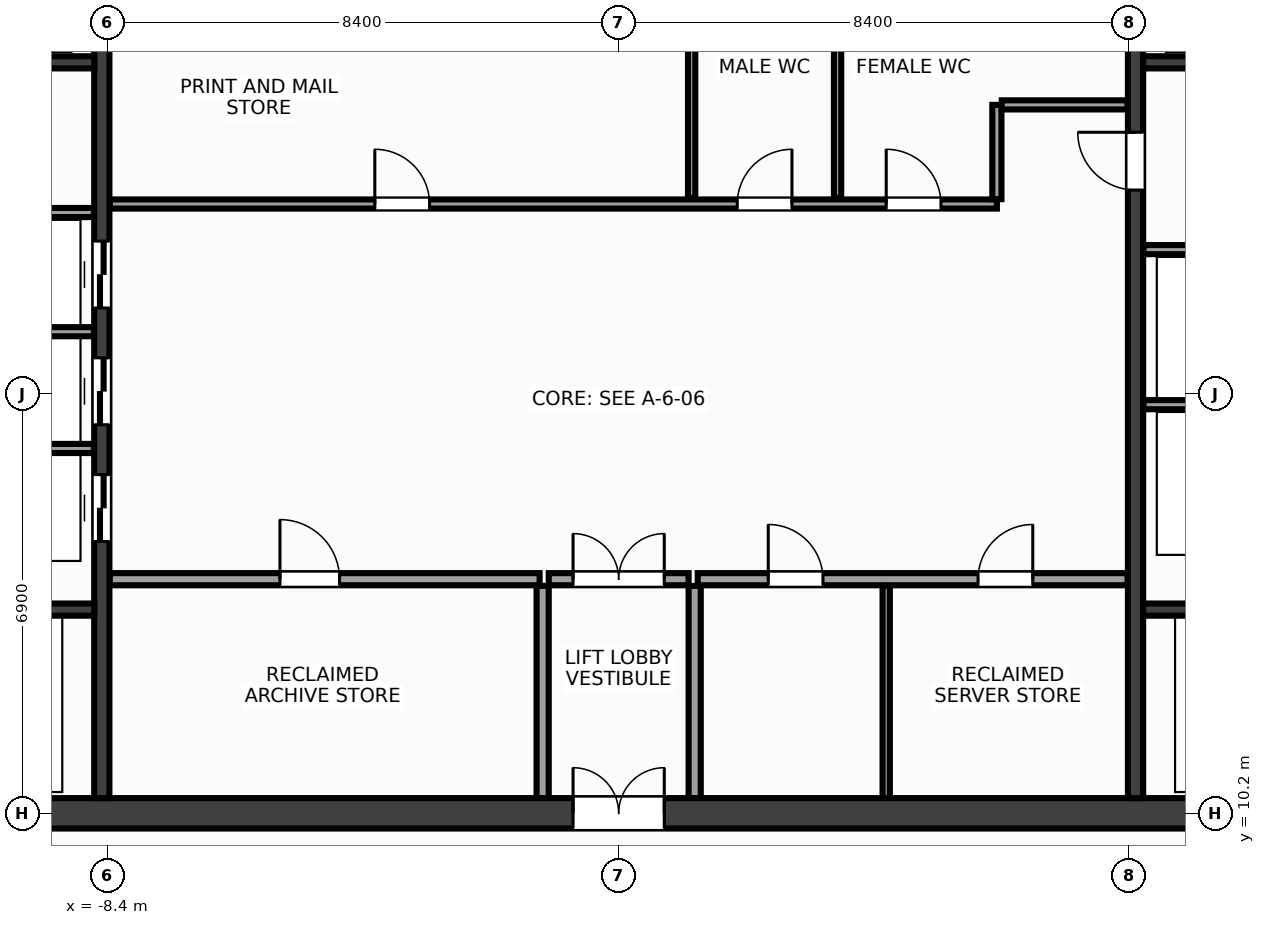
"""IFC4 building model, lengths in metres.
Left out: names, types, materials, properties, quantities, classifications, styles, units other than length and angle.
Written with IfcOpenShell. Run it as: python <this file> out.ifc"""

import sys

from ifc_helpers import new_model, si_unit, direction, frame, frame_2d, origin, place, context, subcontext, project, spatial, rectangle, extrude, source, transform, mapped, element, fill, save


model = new_model("IFC4")
c1 = context("Model", 3, precision=1e-05, world=origin(), true_north=direction((0.0, 1.0)))
c2 = subcontext(c1, "Body", "Model", "MODEL_VIEW")
j1 = project(units=[si_unit("LENGTHUNIT", "METRE"), si_unit("PLANEANGLEUNIT", "RADIAN")], contexts=[c1])
p1 = place(None, origin())
s1 = spatial("IfcSite", under=j1, at=p1, CompositionType="ELEMENT")
p2 = place(p1, origin())
s2 = spatial("IfcBuilding", under=s1, at=p2, CompositionType="ELEMENT")
p3 = place(p2, frame((0.0, 0.0, 221.6)))
s3 = spatial("IfcBuildingStorey", under=s2, at=p3, CompositionType="ELEMENT", Elevation=221.6)
m1 = source(origin(), c2, "Body", "SweptSolid", [
    extrude(rectangle(XDim=31.7, YDim=0.5, at=frame_2d((15.85, 0.0))), origin(), (0.0, 0.0, 1.0), 3.6),
])
p4 = place(p3, frame((-15.85, 10.2, 0.0), z_axis=(0.0, 0.0, 1.0), x_axis=(1.0, 0.0, 0.0)))
e1 = element("IfcWall", 1, at=p4, inside=s3, PredefinedType="SHEAR", context=c2, shape_type="MappedRepresentation", body=[
    mapped(m1, transform((0.0, 0.0, 0.0), x_axis=(1.0, 0.0, 0.0), y_axis=(0.0, 1.0, 0.0), z_axis=(0.0, 0.0, 1.0), scale=1.0)),
])
p5 = place(p4, frame((1.7, 0.0, 0.0)))
e2 = element("IfcOpeningElement", 2, at=p5, cuts=e1, PredefinedType="OPENING", context=c2, shape_type="SweptSolid", body=[
    extrude(rectangle(XDim=1.6, YDim=2.15, at=frame_2d((0.8, 1.075))), frame((0.0, 0.262, 0.0), z_axis=(0.0, -1.0, 0.0), x_axis=(1.0, 0.0, 0.0)), (0.0, 0.0, 1.0), 0.524),
])
p6 = place(p4, frame((28.4, 0.0, 0.0)))
e3 = element("IfcOpeningElement", 3, at=p6, cuts=e1, PredefinedType="OPENING", context=c2, shape_type="SweptSolid", body=[
    extrude(rectangle(XDim=1.6, YDim=2.15, at=frame_2d((0.8, 1.075))), frame((0.0, 0.262, 0.0), z_axis=(0.0, -1.0, 0.0), x_axis=(1.0, 0.0, 0.0)), (0.0, 0.0, 1.0), 0.524),
])
p7 = place(p4, frame((15.1, 0.0, 0.0)))
e4 = element("IfcOpeningElement", 4, at=p7, cuts=e1, PredefinedType="OPENING", context=c2, shape_type="SweptSolid", body=[
    extrude(rectangle(XDim=1.5, YDim=2.2, at=frame_2d((0.75, 1.1))), frame((0.0, 0.262, 0.0), z_axis=(0.0, -1.0, 0.0), x_axis=(1.0, 0.0, 0.0)), (0.0, 0.0, 1.0), 0.524),
])
m2 = source(origin(), c2, "Body", "SweptSolid", [
    extrude(rectangle(XDim=13.1, YDim=0.25, at=frame_2d((6.55, 0.0))), origin(), (0.0, 0.0, 1.0), 3.6),
])
p8 = place(p3, frame((-8.5, 10.45, 0.0), z_axis=(0.0, 0.0, 1.0), x_axis=(0.0, 1.0, 0.0)))
e5 = element("IfcWall", 5, at=p8, inside=s3, PredefinedType="SHEAR", context=c2, shape_type="MappedRepresentation", body=[
    mapped(m2, transform((0.0, 0.0, 0.0), x_axis=(1.0, 0.0, 0.0), y_axis=(0.0, 1.0, 0.0), z_axis=(0.0, 0.0, 1.0), scale=1.0)),
])
p9 = place(p8, frame((4.22, 0.0, 0.0)))
e6 = element("IfcOpeningElement", 6, at=p9, cuts=e5, PredefinedType="OPENING", context=c2, shape_type="SweptSolid", body=[
    extrude(rectangle(XDim=1.1, YDim=2.15, at=frame_2d((0.55, 1.075))), frame((0.0, 0.137, 0.0), z_axis=(0.0, -1.0, 0.0), x_axis=(1.0, 0.0, 0.0)), (0.0, 0.0, 1.0), 0.274),
])
p10 = place(p8, frame((6.14, 0.0, 0.0)))
e7 = element("IfcOpeningElement", 7, at=p10, cuts=e5, PredefinedType="OPENING", context=c2, shape_type="SweptSolid", body=[
    extrude(rectangle(XDim=1.1, YDim=2.15, at=frame_2d((0.55, 1.075))), frame((0.0, 0.137, 0.0), z_axis=(0.0, -1.0, 0.0), x_axis=(1.0, 0.0, 0.0)), (0.0, 0.0, 1.0), 0.274),
])
p11 = place(p8, frame((8.06, 0.0, 0.0)))
e8 = element("IfcOpeningElement", 8, at=p11, cuts=e5, PredefinedType="OPENING", context=c2, shape_type="SweptSolid", body=[
    extrude(rectangle(XDim=1.1, YDim=2.15, at=frame_2d((0.55, 1.075))), frame((0.0, 0.137, 0.0), z_axis=(0.0, -1.0, 0.0), x_axis=(1.0, 0.0, 0.0)), (0.0, 0.0, 1.0), 0.274),
])
p12 = place(p3, frame((8.5, 10.45, 0.0), z_axis=(0.0, 0.0, 1.0), x_axis=(0.0, 1.0, 0.0)))
e9 = element("IfcWall", 9, at=p12, inside=s3, PredefinedType="SHEAR", context=c2, shape_type="MappedRepresentation", body=[
    mapped(m2, transform((0.0, 0.0, 0.0), x_axis=(1.0, 0.0, 0.0), y_axis=(0.0, 1.0, 0.0), z_axis=(0.0, 0.0, 1.0), scale=1.0)),
])
p13 = place(p12, frame((10.0, 0.0, 0.0)))
e10 = element("IfcOpeningElement", 10, at=p13, cuts=e9, PredefinedType="OPENING", context=c2, shape_type="SweptSolid", body=[
    extrude(rectangle(XDim=0.95, YDim=2.15, at=frame_2d((0.475, 1.075))), frame((0.0, 0.137, 0.0), z_axis=(0.0, -1.0, 0.0), x_axis=(1.0, 0.0, 0.0)), (0.0, 0.0, 1.0), 0.274),
])
m3 = source(origin(), c2, "Body", "SweptSolid", [
    extrude(rectangle(XDim=2.825, YDim=0.2, at=frame_2d((1.413, 0.0))), origin(), (0.0, 0.0, 1.0), 3.6),
])
for number, where, z_axis, x_axis in (
    (11, (-11.45, 13.55, 0.0), (0.0, 0.0, 1.0), (1.0, 0.0, 0.0)),
    (12, (8.625, 13.55, 0.0), (0.0, 0.0, 1.0), (1.0, 0.0, 0.0)),
):
    element("IfcWall", number, at=place(p3, frame(where, z_axis=z_axis, x_axis=x_axis)), inside=s3, PredefinedType="SHEAR", context=c2, shape_type="MappedRepresentation", body=[
        mapped(m3, transform((0.0, 0.0, 0.0), x_axis=(1.0, 0.0, 0.0), y_axis=(0.0, 1.0, 0.0), z_axis=(0.0, 0.0, 1.0), scale=1.0)),
    ])
m4 = source(origin(), c2, "Body", "SweptSolid", [
    extrude(rectangle(XDim=3.02, YDim=0.2, at=frame_2d((1.51, 0.0))), origin(), (0.0, 0.0, 1.0), 3.6),
])
for number, where, z_axis, x_axis in (
    (13, (-11.645, 22.55, 0.0), (0.0, 0.0, 1.0), (1.0, 0.0, 0.0)),
    (14, (8.625, 22.55, 0.0), (0.0, 0.0, 1.0), (1.0, 0.0, 0.0)),
):
    element("IfcWall", number, at=place(p3, frame(where, z_axis=z_axis, x_axis=x_axis)), inside=s3, PredefinedType="SHEAR", context=c2, shape_type="MappedRepresentation", body=[
        mapped(m4, transform((0.0, 0.0, 0.0), x_axis=(1.0, 0.0, 0.0), y_axis=(0.0, 1.0, 0.0), z_axis=(0.0, 0.0, 1.0), scale=1.0)),
    ])
m5 = source(origin(), c2, "Body", "SweptSolid", [
    extrude(rectangle(XDim=3.01, YDim=0.15, at=frame_2d((1.505, 0.0))), origin(), (0.0, 0.0, 1.0), 3.38),
])
for number, where, z_axis, x_axis in (
    (15, (-11.64, 16.2, 0.0), (0.0, 0.0, 1.0), (1.0, 0.0, 0.0)),
    (16, (-11.64, 18.12, 0.0), (0.0, 0.0, 1.0), (1.0, 0.0, 0.0)),
    (17, (-11.64, 20.08, 0.0), (0.0, 0.0, 1.0), (1.0, 0.0, 0.0)),
    (18, (8.63, 16.92, 0.0), (0.0, 0.0, 1.0), (1.0, 0.0, 0.0)),
    (19, (8.63, 19.47, 0.0), (0.0, 0.0, 1.0), (1.0, 0.0, 0.0)),
):
    element("IfcWall", number, at=place(p3, frame(where, z_axis=z_axis, x_axis=x_axis)), inside=s3, PredefinedType="PARTITIONING", context=c2, shape_type="MappedRepresentation", body=[
        mapped(m5, transform((0.0, 0.0, 0.0), x_axis=(1.0, 0.0, 0.0), y_axis=(0.0, 1.0, 0.0), z_axis=(0.0, 0.0, 1.0), scale=1.0)),
    ])
m6 = source(origin(), c2, "Body", "SweptSolid", [
    extrude(rectangle(XDim=7.07, YDim=0.2, at=frame_2d((3.535, 0.0))), origin(), (0.0, 0.0, 1.0), 3.38),
])
p14 = place(p3, frame((-8.37, 14.05, 0.0), z_axis=(0.0, 0.0, 1.0), x_axis=(1.0, 0.0, 0.0)))
e20 = element("IfcWall", 20, at=p14, inside=s3, PredefinedType="PARTITIONING", context=c2, shape_type="MappedRepresentation", body=[
    mapped(m6, transform((0.0, 0.0, 0.0), x_axis=(1.0, 0.0, 0.0), y_axis=(0.0, 1.0, 0.0), z_axis=(0.0, 0.0, 1.0), scale=1.0)),
])
p15 = place(p14, frame((2.8, 0.0, 0.0)))
e21 = element("IfcOpeningElement", 21, at=p15, cuts=e20, PredefinedType="OPENING", context=c2, shape_type="SweptSolid", body=[
    extrude(rectangle(XDim=0.98, YDim=2.15, at=frame_2d((0.49, 1.075))), frame((0.0, 0.112, 0.0), z_axis=(0.0, -1.0, 0.0), x_axis=(1.0, 0.0, 0.0)), (0.0, 0.0, 1.0), 0.224),
])
p16 = place(p3, frame((1.3, 14.05, 0.0), z_axis=(0.0, 0.0, 1.0), x_axis=(1.0, 0.0, 0.0)))
e22 = element("IfcWall", 22, at=p16, inside=s3, PredefinedType="PARTITIONING", context=c2, shape_type="MappedRepresentation", body=[
    mapped(m6, transform((0.0, 0.0, 0.0), x_axis=(1.0, 0.0, 0.0), y_axis=(0.0, 1.0, 0.0), z_axis=(0.0, 0.0, 1.0), scale=1.0)),
])
p17 = place(p16, frame((1.16, 0.0, 0.0)))
e23 = element("IfcOpeningElement", 23, at=p17, cuts=e22, PredefinedType="OPENING", context=c2, shape_type="SweptSolid", body=[
    extrude(rectangle(XDim=0.9, YDim=2.15, at=frame_2d((0.45, 1.075))), frame((0.0, 0.112, 0.0), z_axis=(0.0, -1.0, 0.0), x_axis=(1.0, 0.0, 0.0)), (0.0, 0.0, 1.0), 0.224),
])
p18 = place(p16, frame((4.61, 0.0, 0.0)))
e24 = element("IfcOpeningElement", 24, at=p18, cuts=e22, PredefinedType="OPENING", context=c2, shape_type="SweptSolid", body=[
    extrude(rectangle(XDim=0.9, YDim=2.15, at=frame_2d((0.45, 1.075))), frame((0.0, 0.112, 0.0), z_axis=(0.0, -1.0, 0.0), x_axis=(1.0, 0.0, 0.0)), (0.0, 0.0, 1.0), 0.224),
])
m7 = source(origin(), c2, "Body", "SweptSolid", [
    extrude(rectangle(XDim=3.49, YDim=0.2, at=frame_2d((1.745, 0.0))), origin(), (0.0, 0.0, 1.0), 3.38),
])
for number, where, z_axis, x_axis in (
    (25, (-1.25, 10.45, 0.0), (0.0, 0.0, 1.0), (0.0, 1.0, 0.0)),
    (26, (1.25, 10.45, 0.0), (0.0, 0.0, 1.0), (0.0, 1.0, 0.0)),
):
    element("IfcWall", number, at=place(p3, frame(where, z_axis=z_axis, x_axis=x_axis)), inside=s3, PredefinedType="PARTITIONING", context=c2, shape_type="MappedRepresentation", body=[
        mapped(m7, transform((0.0, 0.0, 0.0), x_axis=(1.0, 0.0, 0.0), y_axis=(0.0, 1.0, 0.0), z_axis=(0.0, 0.0, 1.0), scale=1.0)),
    ])
m8 = source(origin(), c2, "Body", "SweptSolid", [
    extrude(rectangle(XDim=2.3, YDim=0.2, at=frame_2d((1.15, 0.0))), origin(), (0.0, 0.0, 1.0), 3.38),
])
p19 = place(p3, frame((-1.15, 14.05, 0.0), z_axis=(0.0, 0.0, 1.0), x_axis=(1.0, 0.0, 0.0)))
e27 = element("IfcWall", 27, at=p19, inside=s3, PredefinedType="PARTITIONING", context=c2, shape_type="MappedRepresentation", body=[
    mapped(m8, transform((0.0, 0.0, 0.0), x_axis=(1.0, 0.0, 0.0), y_axis=(0.0, 1.0, 0.0), z_axis=(0.0, 0.0, 1.0), scale=1.0)),
])
p20 = place(p19, frame((0.4, 0.0, 0.0)))
e28 = element("IfcOpeningElement", 28, at=p20, cuts=e27, PredefinedType="OPENING", context=c2, shape_type="SweptSolid", body=[
    extrude(rectangle(XDim=1.5, YDim=2.2, at=frame_2d((0.75, 1.1))), frame((0.0, 0.112, 0.0), z_axis=(0.0, -1.0, 0.0), x_axis=(1.0, 0.0, 0.0)), (0.0, 0.0, 1.0), 0.224),
])
m9 = source(origin(), c2, "Body", "SweptSolid", [
    extrude(rectangle(XDim=14.59, YDim=0.15, at=frame_2d((7.295, 0.0))), origin(), (0.0, 0.0, 1.0), 3.38),
])
p21 = place(p3, frame((-8.37, 20.22, 0.0), z_axis=(0.0, 0.0, 1.0), x_axis=(1.0, 0.0, 0.0)))
e29 = element("IfcWall", 29, at=p21, inside=s3, PredefinedType="PARTITIONING", context=c2, shape_type="MappedRepresentation", body=[
    mapped(m9, transform((0.0, 0.0, 0.0), x_axis=(1.0, 0.0, 0.0), y_axis=(0.0, 1.0, 0.0), z_axis=(0.0, 0.0, 1.0), scale=1.0)),
])
p22 = place(p21, frame((4.36, 0.0, 0.0)))
e30 = element("IfcOpeningElement", 30, at=p22, cuts=e29, PredefinedType="OPENING", context=c2, shape_type="SweptSolid", body=[
    extrude(rectangle(XDim=0.9, YDim=2.15, at=frame_2d((0.45, 1.075))), frame((0.0, 0.087, 0.0), z_axis=(0.0, -1.0, 0.0), x_axis=(1.0, 0.0, 0.0)), (0.0, 0.0, 1.0), 0.174),
])
p23 = place(p21, frame((10.32, 0.0, 0.0)))
e31 = element("IfcOpeningElement", 31, at=p23, cuts=e29, PredefinedType="OPENING", context=c2, shape_type="SweptSolid", body=[
    extrude(rectangle(XDim=0.9, YDim=2.15, at=frame_2d((0.45, 1.075))), frame((0.0, 0.087, 0.0), z_axis=(0.0, -1.0, 0.0), x_axis=(1.0, 0.0, 0.0)), (0.0, 0.0, 1.0), 0.174),
])
p24 = place(p21, frame((12.77, 0.0, 0.0)))
e32 = element("IfcOpeningElement", 32, at=p24, cuts=e29, PredefinedType="OPENING", context=c2, shape_type="SweptSolid", body=[
    extrude(rectangle(XDim=0.9, YDim=2.15, at=frame_2d((0.45, 1.075))), frame((0.0, 0.087, 0.0), z_axis=(0.0, -1.0, 0.0), x_axis=(1.0, 0.0, 0.0)), (0.0, 0.0, 1.0), 0.174),
])
m10 = source(origin(), c2, "Body", "SweptSolid", [
    extrude(rectangle(XDim=1.55, YDim=0.15, at=frame_2d((0.775, 0.0))), origin(), (0.0, 0.0, 1.0), 3.38),
])
p25 = place(p3, frame((6.22, 20.3, 0.0), z_axis=(0.0, 0.0, 1.0), x_axis=(0.0, 1.0, 0.0)))
e33 = element("IfcWall", 33, at=p25, inside=s3, PredefinedType="PARTITIONING", context=c2, shape_type="MappedRepresentation", body=[
    mapped(m10, transform((0.0, 0.0, 0.0), x_axis=(1.0, 0.0, 0.0), y_axis=(0.0, 1.0, 0.0), z_axis=(0.0, 0.0, 1.0), scale=1.0)),
])
m11 = source(origin(), c2, "Body", "SweptSolid", [
    extrude(rectangle(XDim=2.07, YDim=0.15, at=frame_2d((1.035, 0.0))), origin(), (0.0, 0.0, 1.0), 3.38),
])
p26 = place(p3, frame((6.3, 21.85, 0.0), z_axis=(0.0, 0.0, 1.0), x_axis=(1.0, 0.0, 0.0)))
e34 = element("IfcWall", 34, at=p26, inside=s3, PredefinedType="PARTITIONING", context=c2, shape_type="MappedRepresentation", body=[
    mapped(m11, transform((0.0, 0.0, 0.0), x_axis=(1.0, 0.0, 0.0), y_axis=(0.0, 1.0, 0.0), z_axis=(0.0, 0.0, 1.0), scale=1.0)),
])
m12 = source(origin(), c2, "Body", "SweptSolid", [
    extrude(rectangle(XDim=3.49, YDim=0.12, at=frame_2d((1.745, 0.0))), origin(), (0.0, 0.0, 1.0), 3.38),
])
p27 = place(p3, frame((4.4, 10.45, 0.0), z_axis=(0.0, 0.0, 1.0), x_axis=(0.0, 1.0, 0.0)))
e35 = element("IfcWall", 35, at=p27, inside=s3, PredefinedType="PARTITIONING", context=c2, shape_type="MappedRepresentation", body=[
    mapped(m12, transform((0.0, 0.0, 0.0), x_axis=(1.0, 0.0, 0.0), y_axis=(0.0, 1.0, 0.0), z_axis=(0.0, 0.0, 1.0), scale=1.0)),
])
m13 = source(origin(), c2, "Body", "SweptSolid", [
    extrude(rectangle(XDim=3.19, YDim=0.12, at=frame_2d((1.595, 0.0))), origin(), (0.0, 0.0, 1.0), 3.38),
])
for number, where, z_axis, x_axis in (
    (36, (1.2, 20.32, 0.0), (0.0, 0.0, 1.0), (0.0, 1.0, 0.0)),
    (37, (3.6, 20.32, 0.0), (0.0, 0.0, 1.0), (0.0, 1.0, 0.0)),
):
    element("IfcWall", number, at=place(p3, frame(where, z_axis=z_axis, x_axis=x_axis)), inside=s3, PredefinedType="PARTITIONING", context=c2, shape_type="MappedRepresentation", body=[
        mapped(m13, transform((0.0, 0.0, 0.0), x_axis=(1.0, 0.0, 0.0), y_axis=(0.0, 1.0, 0.0), z_axis=(0.0, 0.0, 1.0), scale=1.0)),
    ])
m14 = source(origin(), c2, "Body", "SweptSolid", [
    extrude(rectangle(XDim=1.1, YDim=2.15, at=frame_2d((0.55, 1.075))), frame((0.0, 0.025, 0.0), z_axis=(0.0, -1.0, 0.0), x_axis=(1.0, 0.0, 0.0)), (0.0, 0.0, 1.0), 0.05),
])
p28 = place(p9, origin())
e38 = element("IfcDoor", 38, at=p28, inside=s3, OperationType="DOUBLE_DOOR_SLIDING", PredefinedType="DOOR", context=c2, shape_type="MappedRepresentation", body=[
    mapped(m14, transform((0.0, 0.0, 0.0), x_axis=(1.0, 0.0, 0.0), y_axis=(0.0, 1.0, 0.0), z_axis=(0.0, 0.0, 1.0), scale=1.0)),
])
fill(e6, e38)
p29 = place(p10, origin())
e39 = element("IfcDoor", 39, at=p29, inside=s3, OperationType="DOUBLE_DOOR_SLIDING", PredefinedType="DOOR", context=c2, shape_type="MappedRepresentation", body=[
    mapped(m14, transform((0.0, 0.0, 0.0), x_axis=(1.0, 0.0, 0.0), y_axis=(0.0, 1.0, 0.0), z_axis=(0.0, 0.0, 1.0), scale=1.0)),
])
fill(e7, e39)
p30 = place(p11, origin())
e40 = element("IfcDoor", 40, at=p30, inside=s3, OperationType="DOUBLE_DOOR_SLIDING", PredefinedType="DOOR", context=c2, shape_type="MappedRepresentation", body=[
    mapped(m14, transform((0.0, 0.0, 0.0), x_axis=(1.0, 0.0, 0.0), y_axis=(0.0, 1.0, 0.0), z_axis=(0.0, 0.0, 1.0), scale=1.0)),
])
fill(e8, e40)
m15 = source(origin(), c2, "Body", "SweptSolid", [
    extrude(rectangle(XDim=0.95, YDim=2.15, at=frame_2d((0.475, 1.075))), frame((0.0, 0.025, 0.0), z_axis=(0.0, -1.0, 0.0), x_axis=(1.0, 0.0, 0.0)), (0.0, 0.0, 1.0), 0.05),
])
p31 = place(p13, origin())
e41 = element("IfcDoor", 41, at=p31, inside=s3, OperationType="SINGLE_SWING_RIGHT", PredefinedType="DOOR", context=c2, shape_type="MappedRepresentation", body=[
    mapped(m15, transform((0.0, 0.0, 0.0), x_axis=(1.0, 0.0, 0.0), y_axis=(0.0, 1.0, 0.0), z_axis=(0.0, 0.0, 1.0), scale=1.0)),
])
fill(e10, e41)
m16 = source(origin(), c2, "Body", "SweptSolid", [
    extrude(rectangle(XDim=0.98, YDim=2.15, at=frame_2d((0.49, 1.075))), frame((0.0, 0.025, 0.0), z_axis=(0.0, -1.0, 0.0), x_axis=(1.0, 0.0, 0.0)), (0.0, 0.0, 1.0), 0.05),
])
p32 = place(p15, origin())
e42 = element("IfcDoor", 42, at=p32, inside=s3, OperationType="SINGLE_SWING_LEFT", PredefinedType="DOOR", context=c2, shape_type="MappedRepresentation", body=[
    mapped(m16, transform((0.0, 0.0, 0.0), x_axis=(1.0, 0.0, 0.0), y_axis=(0.0, 1.0, 0.0), z_axis=(0.0, 0.0, 1.0), scale=1.0)),
])
fill(e21, e42)
m17 = source(origin(), c2, "Body", "SweptSolid", [
    extrude(rectangle(XDim=0.9, YDim=2.15, at=frame_2d((0.45, 1.075))), frame((0.0, 0.025, 0.0), z_axis=(0.0, -1.0, 0.0), x_axis=(1.0, 0.0, 0.0)), (0.0, 0.0, 1.0), 0.05),
])
p33 = place(p17, origin())
e43 = element("IfcDoor", 43, at=p33, inside=s3, OperationType="SINGLE_SWING_LEFT", PredefinedType="DOOR", context=c2, shape_type="MappedRepresentation", body=[
    mapped(m17, transform((0.0, 0.0, 0.0), x_axis=(1.0, 0.0, 0.0), y_axis=(0.0, 1.0, 0.0), z_axis=(0.0, 0.0, 1.0), scale=1.0)),
])
fill(e23, e43)
p34 = place(p18, origin())
e44 = element("IfcDoor", 44, at=p34, inside=s3, OperationType="SINGLE_SWING_RIGHT", PredefinedType="DOOR", context=c2, shape_type="MappedRepresentation", body=[
    mapped(m17, transform((0.0, 0.0, 0.0), x_axis=(1.0, 0.0, 0.0), y_axis=(0.0, 1.0, 0.0), z_axis=(0.0, 0.0, 1.0), scale=1.0)),
])
fill(e24, e44)
m18 = source(origin(), c2, "Body", "SweptSolid", [
    extrude(rectangle(XDim=1.5, YDim=2.2, at=frame_2d((0.75, 1.1))), frame((0.0, 0.025, 0.0), z_axis=(0.0, -1.0, 0.0), x_axis=(1.0, 0.0, 0.0)), (0.0, 0.0, 1.0), 0.05),
])
p35 = place(p20, origin())
e45 = element("IfcDoor", 45, at=p35, inside=s3, OperationType="DOUBLE_DOOR_SINGLE_SWING", PredefinedType="DOOR", context=c2, shape_type="MappedRepresentation", body=[
    mapped(m18, transform((0.0, 0.0, 0.0), x_axis=(1.0, 0.0, 0.0), y_axis=(0.0, 1.0, 0.0), z_axis=(0.0, 0.0, 1.0), scale=1.0)),
])
fill(e28, e45)
p36 = place(p7, origin())
e46 = element("IfcDoor", 46, at=p36, inside=s3, OperationType="DOUBLE_DOOR_SINGLE_SWING", PredefinedType="DOOR", context=c2, shape_type="MappedRepresentation", body=[
    mapped(m18, transform((0.0, 0.0, 0.0), x_axis=(1.0, 0.0, 0.0), y_axis=(0.0, 1.0, 0.0), z_axis=(0.0, 0.0, 1.0), scale=1.0)),
])
fill(e4, e46)
p37 = place(p22, origin())
e47 = element("IfcDoor", 47, at=p37, inside=s3, OperationType="SINGLE_SWING_LEFT", PredefinedType="DOOR", context=c2, shape_type="MappedRepresentation", body=[
    mapped(m17, transform((0.0, 0.0, 0.0), x_axis=(1.0, 0.0, 0.0), y_axis=(0.0, 1.0, 0.0), z_axis=(0.0, 0.0, 1.0), scale=1.0)),
])
fill(e30, e47)
p38 = place(p23, origin())
e48 = element("IfcDoor", 48, at=p38, inside=s3, OperationType="SINGLE_SWING_RIGHT", PredefinedType="DOOR", context=c2, shape_type="MappedRepresentation", body=[
    mapped(m17, transform((0.0, 0.0, 0.0), x_axis=(1.0, 0.0, 0.0), y_axis=(0.0, 1.0, 0.0), z_axis=(0.0, 0.0, 1.0), scale=1.0)),
])
fill(e31, e48)
p39 = place(p24, origin())
e49 = element("IfcDoor", 49, at=p39, inside=s3, OperationType="SINGLE_SWING_LEFT", PredefinedType="DOOR", context=c2, shape_type="MappedRepresentation", body=[
    mapped(m17, transform((0.0, 0.0, 0.0), x_axis=(1.0, 0.0, 0.0), y_axis=(0.0, 1.0, 0.0), z_axis=(0.0, 0.0, 1.0), scale=1.0)),
])
fill(e32, e49)
save(model, sys.argv[1])
